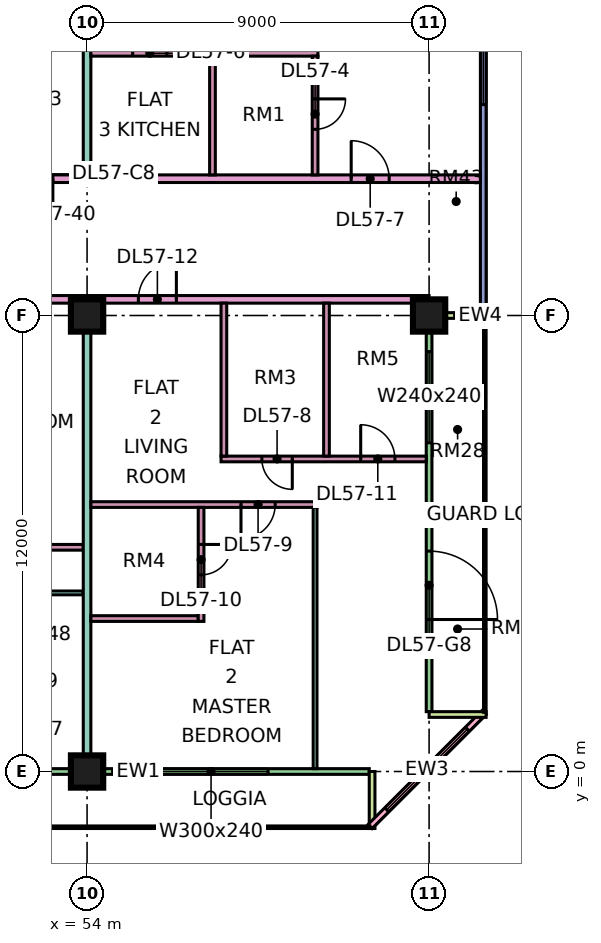
"""IFC4 building model, lengths in metres.
Left out: names, types, materials, properties, quantities, classifications, styles, units other than length and angle.
Written with IfcOpenShell. Run it as: python <this file> out.ifc"""

import sys

from ifc_helpers import new_model, si_unit, direction, frame, frame_2d, origin, origin_2d, place, context, subcontext, project, spatial, rectangle, extrude, element, fill, save


model = new_model("IFC4")
c1 = context("Model", 3, precision=1e-05, world=origin(), true_north=direction((0.0, 1.0)))
c2 = subcontext(c1, "Body", "Model", "MODEL_VIEW")
j1 = project(units=[si_unit("LENGTHUNIT", "METRE"), si_unit("PLANEANGLEUNIT", "RADIAN")], contexts=[c1])
p1 = place(None, origin())
s1 = spatial("IfcSite", under=j1, at=p1, CompositionType="ELEMENT")
p2 = place(p1, origin())
s2 = spatial("IfcBuilding", under=s1, at=p2, CompositionType="ELEMENT")
p3 = place(p2, frame((0.0, 0.0, 241.65)))
s3 = spatial("IfcBuildingStorey", under=s2, at=p3, CompositionType="ELEMENT", Elevation=241.65)
for number, where, z_axis, x_axis in (
    (1, (54.0, 0.0, 0.0), (0.0, 0.0, 1.0), (1.0, 0.0, 0.0)),
    (2, (54.0, 12.0, 0.0), (0.0, 0.0, 1.0), (1.0, 0.0, 0.0)),
    (3, (63.0, 12.0, 0.0), (0.0, 0.0, 1.0), (1.0, 0.0, 0.0)),
):
    element("IfcColumn", number, at=place(p3, frame(where, z_axis=z_axis, x_axis=x_axis)), inside=s3, PredefinedType="COLUMN", context=c2, shape_type="SweptSolid", body=[
        extrude(rectangle(XDim=0.85, YDim=0.85, at=origin_2d()), origin(), (0.0, 0.0, 1.0), 3.75),
    ])
p4 = place(p3, frame((48.075, 0.0, 0.0), z_axis=(0.0, 0.0, 1.0), x_axis=(1.0, 0.0, 0.0)))
e4 = element("IfcWall", 4, at=p4, inside=s3, PredefinedType="SOLIDWALL", context=c2, shape_type="SweptSolid", body=[
    extrude(rectangle(XDim=13.35, YDim=0.15, at=frame_2d((6.675, 0.0))), origin(), (0.0, 0.0, 1.0), 3.35),
])
p5 = place(p4, frame((0.562, 0.0, 0.45)))
e5 = element("IfcOpeningElement", 5, at=p5, cuts=e4, PredefinedType="OPENING", context=c2, shape_type="SweptSolid", body=[
    extrude(rectangle(XDim=1.8, YDim=2.4, at=frame_2d((0.9, 1.2))), frame((0.0, 0.085, 0.0), z_axis=(0.0, -1.0, 0.0), x_axis=(1.0, 0.0, 0.0)), (0.0, 0.0, 1.0), 0.17),
])
p6 = place(p4, frame((3.562, 0.0, 0.0)))
e6 = element("IfcOpeningElement", 6, at=p6, cuts=e4, PredefinedType="OPENING", context=c2, shape_type="SweptSolid", body=[
    extrude(rectangle(XDim=1.2, YDim=2.4, at=frame_2d((0.6, 1.2))), frame((0.0, 0.085, 0.0), z_axis=(0.0, -1.0, 0.0), x_axis=(1.0, 0.0, 0.0)), (0.0, 0.0, 1.0), 0.17),
])
p7 = place(p4, frame((7.688, 0.0, 0.45)))
e7 = element("IfcOpeningElement", 7, at=p7, cuts=e4, PredefinedType="OPENING", context=c2, shape_type="SweptSolid", body=[
    extrude(rectangle(XDim=3.0, YDim=2.4, at=frame_2d((1.5, 1.2))), frame((0.0, 0.085, 0.0), z_axis=(0.0, -1.0, 0.0), x_axis=(1.0, 0.0, 0.0)), (0.0, 0.0, 1.0), 0.17),
])
p8 = place(p3, frame((61.5, -1.5, 0.0), z_axis=(0.0, 0.0, 1.0), x_axis=(0.0, 1.0, 0.0)))
e8 = element("IfcWall", 8, at=p8, inside=s3, PredefinedType="SOLIDWALL", context=c2, shape_type="SweptSolid", body=[
    extrude(rectangle(XDim=1.5, YDim=0.15, at=frame_2d((0.75, 0.0))), origin(), (0.0, 0.0, 1.0), 3.35),
])
p9 = place(p3, frame((61.447, -1.447, 0.0), z_axis=(0.0, 0.0, 1.0), x_axis=(0.707106781187, 0.707106781187, 0.0)))
e9 = element("IfcWall", 9, at=p9, inside=s3, PredefinedType="SOLIDWALL", context=c2, shape_type="SweptSolid", body=[
    extrude(rectangle(XDim=4.243, YDim=0.15, at=frame_2d((2.121, 0.0))), origin(), (0.0, 0.0, 1.0), 3.35),
])
p10 = place(p9, frame((0.621, 0.0, 0.45)))
e10 = element("IfcOpeningElement", 10, at=p10, cuts=e9, PredefinedType="OPENING", context=c2, shape_type="SweptSolid", body=[
    extrude(rectangle(XDim=3.0, YDim=2.4, at=frame_2d((1.5, 1.2))), frame((0.0, 0.085, 0.0), z_axis=(0.0, -1.0, 0.0), x_axis=(1.0, 0.0, 0.0)), (0.0, 0.0, 1.0), 0.17),
])
p11 = place(p3, frame((63.0, 1.575, 0.0), z_axis=(0.0, 0.0, 1.0), x_axis=(0.0, 1.0, 0.0)))
e11 = element("IfcWall", 11, at=p11, inside=s3, PredefinedType="SOLIDWALL", context=c2, shape_type="SweptSolid", body=[
    extrude(rectangle(XDim=10.35, YDim=0.15, at=frame_2d((5.175, 0.0))), origin(), (0.0, 0.0, 1.0), 3.35),
])
p12 = place(p11, frame((2.425, 0.0, 0.0)))
e12 = element("IfcOpeningElement", 12, at=p12, cuts=e11, PredefinedType="OPENING", context=c2, shape_type="SweptSolid", body=[
    extrude(rectangle(XDim=1.8, YDim=2.4, at=frame_2d((0.9, 1.2))), frame((0.0, 0.085, 0.0), z_axis=(0.0, -1.0, 0.0), x_axis=(1.0, 0.0, 0.0)), (0.0, 0.0, 1.0), 0.17),
])
p13 = place(p11, frame((7.075, 0.0, 0.45)))
e13 = element("IfcOpeningElement", 13, at=p13, cuts=e11, PredefinedType="OPENING", context=c2, shape_type="SweptSolid", body=[
    extrude(rectangle(XDim=2.4, YDim=2.4, at=frame_2d((1.2, 1.2))), frame((0.0, 0.085, 0.0), z_axis=(0.0, -1.0, 0.0), x_axis=(1.0, 0.0, 0.0)), (0.0, 0.0, 1.0), 0.17),
])
for number, where, z_axis, x_axis in (
    (14, (64.5, 1.5, 0.0), (0.0, 0.0, 1.0), (-1.0, 0.0, 0.0)),
    (15, (64.5, 12.0, 0.0), (0.0, 0.0, 1.0), (-1.0, 0.0, 0.0)),
):
    element("IfcWall", number, at=place(p3, frame(where, z_axis=z_axis, x_axis=x_axis)), inside=s3, PredefinedType="SOLIDWALL", context=c2, shape_type="SweptSolid", body=[
        extrude(rectangle(XDim=1.5, YDim=0.15, at=frame_2d((0.75, 0.0))), origin(), (0.0, 0.0, 1.0), 3.35),
    ])
p14 = place(p3, frame((64.425, 12.075, 0.0), z_axis=(0.0, 0.0, 1.0), x_axis=(0.0, 1.0, 0.0)))
e16 = element("IfcWall", 16, at=p14, inside=s3, PredefinedType="SOLIDWALL", context=c2, shape_type="SweptSolid", body=[
    extrude(rectangle(XDim=10.425, YDim=0.15, at=frame_2d((5.212, 0.0))), origin(), (0.0, 0.0, 1.0), 3.35),
])
p15 = place(p14, frame((5.475, 0.0, 0.45)))
e17 = element("IfcOpeningElement", 17, at=p15, cuts=e16, PredefinedType="OPENING", context=c2, shape_type="SweptSolid", body=[
    extrude(rectangle(XDim=3.0, YDim=2.4, at=frame_2d((1.5, 1.2))), frame((0.0, 0.085, 0.0), z_axis=(0.0, -1.0, 0.0), x_axis=(1.0, 0.0, 0.0)), (0.0, 0.0, 1.0), 0.17),
])
p16 = place(p3, frame((33.05, 4.7, 0.0), z_axis=(0.0, 0.0, 1.0), x_axis=(1.0, 0.0, 0.0)))
e18 = element("IfcWall", 18, at=p16, inside=s3, PredefinedType="PARTITIONING", context=c2, shape_type="SweptSolid", body=[
    extrude(rectangle(XDim=20.85, YDim=0.1, at=frame_2d((10.425, 0.0))), origin(), (0.0, 0.0, 1.0), 3.35),
])
p17 = place(p16, frame((1.0, 0.0, 0.0)))
e19 = element("IfcOpeningElement", 19, at=p17, cuts=e18, PredefinedType="OPENING", context=c2, shape_type="SweptSolid", body=[
    extrude(rectangle(XDim=0.9, YDim=2.1, at=frame_2d((0.45, 1.05))), frame((0.0, 0.06, 0.0), z_axis=(0.0, -1.0, 0.0), x_axis=(1.0, 0.0, 0.0)), (0.0, 0.0, 1.0), 0.12),
])
p18 = place(p16, frame((4.0, 0.0, 0.0)))
e20 = element("IfcOpeningElement", 20, at=p18, cuts=e18, PredefinedType="OPENING", context=c2, shape_type="SweptSolid", body=[
    extrude(rectangle(XDim=0.9, YDim=2.1, at=frame_2d((0.45, 1.05))), frame((0.0, 0.06, 0.0), z_axis=(0.0, -1.0, 0.0), x_axis=(1.0, 0.0, 0.0)), (0.0, 0.0, 1.0), 0.12),
])
p19 = place(p16, frame((7.0, 0.0, 0.0)))
e21 = element("IfcOpeningElement", 21, at=p19, cuts=e18, PredefinedType="OPENING", context=c2, shape_type="SweptSolid", body=[
    extrude(rectangle(XDim=0.9, YDim=2.1, at=frame_2d((0.45, 1.05))), frame((0.0, 0.06, 0.0), z_axis=(0.0, -1.0, 0.0), x_axis=(1.0, 0.0, 0.0)), (0.0, 0.0, 1.0), 0.12),
])
p20 = place(p16, frame((19.0, 0.0, 0.0)))
e22 = element("IfcOpeningElement", 22, at=p20, cuts=e18, PredefinedType="OPENING", context=c2, shape_type="SweptSolid", body=[
    extrude(rectangle(XDim=0.9, YDim=2.1, at=frame_2d((0.45, 1.05))), frame((0.0, 0.06, 0.0), z_axis=(0.0, -1.0, 0.0), x_axis=(1.0, 0.0, 0.0)), (0.0, 0.0, 1.0), 0.12),
])
p21 = place(p16, frame((13.0, 0.0, 0.0)))
e23 = element("IfcOpeningElement", 23, at=p21, cuts=e18, PredefinedType="OPENING", context=c2, shape_type="SweptSolid", body=[
    extrude(rectangle(XDim=0.9, YDim=2.1, at=frame_2d((0.45, 1.05))), frame((0.0, 0.06, 0.0), z_axis=(0.0, -1.0, 0.0), x_axis=(1.0, 0.0, 0.0)), (0.0, 0.0, 1.0), 0.12),
])
p22 = place(p3, frame((40.65, 12.425, 0.0), z_axis=(0.0, 0.0, 1.0), x_axis=(1.0, 0.0, 0.0)))
e24 = element("IfcWall", 24, at=p22, inside=s3, PredefinedType="PARTITIONING", context=c2, shape_type="SweptSolid", body=[
    extrude(rectangle(XDim=22.35, YDim=0.2, at=frame_2d((11.175, 0.0))), origin(), (0.0, 0.0, 1.0), 3.35),
])
p23 = place(p22, frame((14.7, 0.0, 0.0)))
e25 = element("IfcOpeningElement", 25, at=p23, cuts=e24, PredefinedType="OPENING", context=c2, shape_type="SweptSolid", body=[
    extrude(rectangle(XDim=1.0, YDim=2.1, at=frame_2d((0.5, 1.05))), frame((0.0, 0.11, 0.0), z_axis=(0.0, -1.0, 0.0), x_axis=(1.0, 0.0, 0.0)), (0.0, 0.0, 1.0), 0.22),
])
p24 = place(p22, frame((1.05, 0.0, 0.0)))
e26 = element("IfcOpeningElement", 26, at=p24, cuts=e24, PredefinedType="OPENING", context=c2, shape_type="SweptSolid", body=[
    extrude(rectangle(XDim=1.0, YDim=2.1, at=frame_2d((0.5, 1.05))), frame((0.0, 0.11, 0.0), z_axis=(0.0, -1.0, 0.0), x_axis=(1.0, 0.0, 0.0)), (0.0, 0.0, 1.0), 0.22),
])
p25 = place(p3, frame((43.575, 5.9, 0.0), z_axis=(0.0, 0.0, 1.0), x_axis=(1.0, 0.0, 0.0)))
e27 = element("IfcWall", 27, at=p25, inside=s3, PredefinedType="PARTITIONING", context=c2, shape_type="SweptSolid", body=[
    extrude(rectangle(XDim=10.325, YDim=0.15, at=frame_2d((5.163, 0.0))), origin(), (0.0, 0.0, 1.0), 3.35),
])
p26 = place(p25, frame((1.825, 0.0, 0.0)))
e28 = element("IfcOpeningElement", 28, at=p26, cuts=e27, PredefinedType="OPENING", context=c2, shape_type="SweptSolid", body=[
    extrude(rectangle(XDim=0.8, YDim=2.1, at=frame_2d((0.4, 1.05))), frame((0.0, 0.085, 0.0), z_axis=(0.0, -1.0, 0.0), x_axis=(1.0, 0.0, 0.0)), (0.0, 0.0, 1.0), 0.17),
])
p27 = place(p25, frame((6.975, 0.0, 0.0)))
e29 = element("IfcOpeningElement", 29, at=p27, cuts=e27, PredefinedType="OPENING", context=c2, shape_type="SweptSolid", body=[
    extrude(rectangle(XDim=0.9, YDim=2.1, at=frame_2d((0.45, 1.05))), frame((0.0, 0.085, 0.0), z_axis=(0.0, -1.0, 0.0), x_axis=(1.0, 0.0, 0.0)), (0.0, 0.0, 1.0), 0.17),
])
p28 = place(p3, frame((51.225, 15.6, 0.0), z_axis=(0.0, 0.0, 1.0), x_axis=(1.0, 0.0, 0.0)))
e30 = element("IfcWall", 30, at=p28, inside=s3, PredefinedType="PARTITIONING", context=c2, shape_type="SweptSolid", body=[
    extrude(rectangle(XDim=13.125, YDim=0.2, at=frame_2d((6.562, 0.0))), origin(), (0.0, 0.0, 1.0), 3.35),
])
p29 = place(p28, frame((9.725, 0.0, 0.0)))
e31 = element("IfcOpeningElement", 31, at=p29, cuts=e30, PredefinedType="OPENING", context=c2, shape_type="SweptSolid", body=[
    extrude(rectangle(XDim=1.0, YDim=2.1, at=frame_2d((0.5, 1.05))), frame((0.0, 0.11, 0.0), z_axis=(0.0, -1.0, 0.0), x_axis=(1.0, 0.0, 0.0)), (0.0, 0.0, 1.0), 0.22),
])
p30 = place(p28, frame((0.875, 0.0, 0.0)))
e32 = element("IfcOpeningElement", 32, at=p30, cuts=e30, PredefinedType="OPENING", context=c2, shape_type="SweptSolid", body=[
    extrude(rectangle(XDim=1.0, YDim=2.1, at=frame_2d((0.5, 1.05))), frame((0.0, 0.11, 0.0), z_axis=(0.0, -1.0, 0.0), x_axis=(1.0, 0.0, 0.0)), (0.0, 0.0, 1.0), 0.22),
])
p31 = place(p3, frame((54.0, 0.074, 0.0), z_axis=(0.0, 0.0, 1.0), x_axis=(0.0, 1.0, 0.0)))
e33 = element("IfcWall", 33, at=p31, inside=s3, PredefinedType="PARTITIONING", context=c2, shape_type="SweptSolid", body=[
    extrude(rectangle(XDim=12.251, YDim=0.2, at=frame_2d((6.125, 0.0))), origin(), (0.0, 0.0, 1.0), 3.35),
])
p32 = place(p3, frame((54.0, 15.7, 0.0), z_axis=(0.0, 0.0, 1.0), x_axis=(0.0, 1.0, 0.0)))
e34 = element("IfcWall", 34, at=p32, inside=s3, PredefinedType="PARTITIONING", context=c2, shape_type="SweptSolid", body=[
    extrude(rectangle(XDim=8.226, YDim=0.2, at=frame_2d((4.113, 0.0))), origin(), (0.0, 0.0, 1.0), 3.35),
])
p33 = place(p3, frame((54.1, 4.025, 0.0), z_axis=(0.0, 0.0, 1.0), x_axis=(1.0, 0.0, 0.0)))
e35 = element("IfcWall", 35, at=p33, inside=s3, PredefinedType="PARTITIONING", context=c2, shape_type="SweptSolid", body=[
    extrude(rectangle(XDim=2.825, YDim=0.15, at=frame_2d((1.413, 0.0))), origin(), (0.0, 0.0, 1.0), 3.35),
])
p34 = place(p3, frame((54.1, 7.025, 0.0), z_axis=(0.0, 0.0, 1.0), x_axis=(1.0, 0.0, 0.0)))
e36 = element("IfcWall", 36, at=p34, inside=s3, PredefinedType="PARTITIONING", context=c2, shape_type="SweptSolid", body=[
    extrude(rectangle(XDim=5.95, YDim=0.15, at=frame_2d((2.975, 0.0))), origin(), (0.0, 0.0, 1.0), 3.35),
])
p35 = place(p34, frame((3.95, 0.0, 0.0)))
e37 = element("IfcOpeningElement", 37, at=p35, cuts=e36, PredefinedType="OPENING", context=c2, shape_type="SweptSolid", body=[
    extrude(rectangle(XDim=0.9, YDim=2.1, at=frame_2d((0.45, 1.05))), frame((0.0, 0.085, 0.0), z_axis=(0.0, -1.0, 0.0), x_axis=(1.0, 0.0, 0.0)), (0.0, 0.0, 1.0), 0.17),
])
p36 = place(p3, frame((54.1, 18.9, 0.0), z_axis=(0.0, 0.0, 1.0), x_axis=(1.0, 0.0, 0.0)))
e38 = element("IfcWall", 38, at=p36, inside=s3, PredefinedType="PARTITIONING", context=c2, shape_type="SweptSolid", body=[
    extrude(rectangle(XDim=5.975, YDim=0.15, at=frame_2d((2.987, 0.0))), origin(), (0.0, 0.0, 1.0), 3.35),
])
p37 = place(p36, frame((1.1, 0.0, 0.0)))
e39 = element("IfcOpeningElement", 39, at=p37, cuts=e38, PredefinedType="OPENING", context=c2, shape_type="SweptSolid", body=[
    extrude(rectangle(XDim=0.9, YDim=2.1, at=frame_2d((0.45, 1.05))), frame((0.0, 0.085, 0.0), z_axis=(0.0, -1.0, 0.0), x_axis=(1.0, 0.0, 0.0)), (0.0, 0.0, 1.0), 0.17),
])
p38 = place(p3, frame((57.0, 3.95, 0.0), z_axis=(0.0, 0.0, 1.0), x_axis=(0.0, 1.0, 0.0)))
e40 = element("IfcWall", 40, at=p38, inside=s3, PredefinedType="PARTITIONING", context=c2, shape_type="SweptSolid", body=[
    extrude(rectangle(XDim=3.0, YDim=0.15, at=frame_2d((1.5, 0.0))), origin(), (0.0, 0.0, 1.0), 3.35),
])
p39 = place(p38, frame((1.225, 0.0, 0.0)))
e41 = element("IfcOpeningElement", 41, at=p39, cuts=e40, PredefinedType="OPENING", context=c2, shape_type="SweptSolid", body=[
    extrude(rectangle(XDim=0.8, YDim=2.1, at=frame_2d((0.4, 1.05))), frame((0.0, 0.085, 0.0), z_axis=(0.0, -1.0, 0.0), x_axis=(1.0, 0.0, 0.0)), (0.0, 0.0, 1.0), 0.17),
])
p40 = place(p3, frame((57.3, 15.7, 0.0), z_axis=(0.0, 0.0, 1.0), x_axis=(0.0, 1.0, 0.0)))
e42 = element("IfcWall", 42, at=p40, inside=s3, PredefinedType="PARTITIONING", context=c2, shape_type="SweptSolid", body=[
    extrude(rectangle(XDim=3.125, YDim=0.15, at=frame_2d((1.562, 0.0))), origin(), (0.0, 0.0, 1.0), 3.35),
])
p41 = place(p3, frame((57.525, 8.225, 0.0), z_axis=(0.0, 0.0, 1.0), x_axis=(1.0, 0.0, 0.0)))
e43 = element("IfcWall", 43, at=p41, inside=s3, PredefinedType="PARTITIONING", context=c2, shape_type="SweptSolid", body=[
    extrude(rectangle(XDim=5.401, YDim=0.15, at=frame_2d((2.701, 0.0))), origin(), (0.0, 0.0, 1.0), 3.35),
])
p42 = place(p41, frame((1.075, 0.0, 0.0)))
e44 = element("IfcOpeningElement", 44, at=p42, cuts=e43, PredefinedType="OPENING", context=c2, shape_type="SweptSolid", body=[
    extrude(rectangle(XDim=0.8, YDim=2.1, at=frame_2d((0.4, 1.05))), frame((0.0, 0.085, 0.0), z_axis=(0.0, -1.0, 0.0), x_axis=(1.0, 0.0, 0.0)), (0.0, 0.0, 1.0), 0.17),
])
p43 = place(p41, frame((3.675, 0.0, 0.0)))
e45 = element("IfcOpeningElement", 45, at=p43, cuts=e43, PredefinedType="OPENING", context=c2, shape_type="SweptSolid", body=[
    extrude(rectangle(XDim=0.9, YDim=2.1, at=frame_2d((0.45, 1.05))), frame((0.0, 0.085, 0.0), z_axis=(0.0, -1.0, 0.0), x_axis=(1.0, 0.0, 0.0)), (0.0, 0.0, 1.0), 0.17),
])
p44 = place(p3, frame((57.6, 8.3, 0.0), z_axis=(0.0, 0.0, 1.0), x_axis=(0.0, 1.0, 0.0)))
e46 = element("IfcWall", 46, at=p44, inside=s3, PredefinedType="PARTITIONING", context=c2, shape_type="SweptSolid", body=[
    extrude(rectangle(XDim=4.025, YDim=0.15, at=frame_2d((2.012, 0.0))), origin(), (0.0, 0.0, 1.0), 3.35),
])
p45 = place(p3, frame((60.0, 0.074, 0.0), z_axis=(0.0, 0.0, 1.0), x_axis=(0.0, 1.0, 0.0)))
e47 = element("IfcWall", 47, at=p45, inside=s3, PredefinedType="PARTITIONING", context=c2, shape_type="SweptSolid", body=[
    extrude(rectangle(XDim=6.876, YDim=0.1, at=frame_2d((3.438, 0.0))), origin(), (0.0, 0.0, 1.0), 3.35),
])
p46 = place(p3, frame((60.0, 15.7, 0.0), z_axis=(0.0, 0.0, 1.0), x_axis=(0.0, 1.0, 0.0)))
e48 = element("IfcWall", 48, at=p46, inside=s3, PredefinedType="PARTITIONING", context=c2, shape_type="SweptSolid", body=[
    extrude(rectangle(XDim=3.125, YDim=0.15, at=frame_2d((1.562, 0.0))), origin(), (0.0, 0.0, 1.0), 3.35),
])
p47 = place(p46, frame((1.2, 0.0, 0.0)))
e49 = element("IfcOpeningElement", 49, at=p47, cuts=e48, PredefinedType="OPENING", context=c2, shape_type="SweptSolid", body=[
    extrude(rectangle(XDim=0.8, YDim=2.1, at=frame_2d((0.4, 1.05))), frame((0.0, 0.085, 0.0), z_axis=(0.0, -1.0, 0.0), x_axis=(1.0, 0.0, 0.0)), (0.0, 0.0, 1.0), 0.17),
])
p48 = place(p3, frame((60.3, 8.3, 0.0), z_axis=(0.0, 0.0, 1.0), x_axis=(0.0, 1.0, 0.0)))
e50 = element("IfcWall", 50, at=p48, inside=s3, PredefinedType="PARTITIONING", context=c2, shape_type="SweptSolid", body=[
    extrude(rectangle(XDim=4.025, YDim=0.15, at=frame_2d((2.012, 0.0))), origin(), (0.0, 0.0, 1.0), 3.35),
])
p49 = place(p7, origin())
e51 = element("IfcWindow", 51, at=p49, inside=s3, PartitioningType="SINGLE_PANEL", PredefinedType="WINDOW", context=c2, shape_type="SweptSolid", body=[
    extrude(rectangle(XDim=3.0, YDim=2.4, at=frame_2d((1.5, 1.2))), frame((0.0, 0.03, 0.0), z_axis=(0.0, -1.0, 0.0), x_axis=(1.0, 0.0, 0.0)), (0.0, 0.0, 1.0), 0.06),
])
fill(e7, e51)
p50 = place(p10, origin())
e52 = element("IfcWindow", 52, at=p50, inside=s3, PartitioningType="SINGLE_PANEL", PredefinedType="WINDOW", context=c2, shape_type="SweptSolid", body=[
    extrude(rectangle(XDim=3.0, YDim=2.4, at=frame_2d((1.5, 1.2))), frame((0.0, 0.03, 0.0), z_axis=(0.0, -1.0, 0.0), x_axis=(1.0, 0.0, 0.0)), (0.0, 0.0, 1.0), 0.06),
])
fill(e10, e52)
p51 = place(p12, frame((1.8, 0.0, 0.0), z_axis=(0.0, 0.0, 1.0), x_axis=(-1.0, 0.0, 0.0)))
e53 = element("IfcDoor", 53, at=p51, inside=s3, OperationType="DOUBLE_DOOR_SINGLE_SWING", PredefinedType="DOOR", context=c2, shape_type="SweptSolid", body=[
    extrude(rectangle(XDim=1.8, YDim=2.4, at=frame_2d((0.9, 1.2))), frame((0.0, 0.025, 0.0), z_axis=(0.0, -1.0, 0.0), x_axis=(1.0, 0.0, 0.0)), (0.0, 0.0, 1.0), 0.05),
])
fill(e12, e53)
p52 = place(p13, origin())
e54 = element("IfcWindow", 54, at=p52, inside=s3, PartitioningType="SINGLE_PANEL", PredefinedType="WINDOW", context=c2, shape_type="SweptSolid", body=[
    extrude(rectangle(XDim=2.4, YDim=2.4, at=frame_2d((1.2, 1.2))), frame((0.0, 0.03, 0.0), z_axis=(0.0, -1.0, 0.0), x_axis=(1.0, 0.0, 0.0)), (0.0, 0.0, 1.0), 0.06),
])
fill(e13, e54)
p53 = place(p15, origin())
e55 = element("IfcWindow", 55, at=p53, inside=s3, PartitioningType="SINGLE_PANEL", PredefinedType="WINDOW", context=c2, shape_type="SweptSolid", body=[
    extrude(rectangle(XDim=3.0, YDim=2.4, at=frame_2d((1.5, 1.2))), frame((0.0, 0.03, 0.0), z_axis=(0.0, -1.0, 0.0), x_axis=(1.0, 0.0, 0.0)), (0.0, 0.0, 1.0), 0.06),
])
fill(e17, e55)
p54 = place(p47, origin())
e56 = element("IfcDoor", 56, at=p54, inside=s3, OperationType="SINGLE_SWING_RIGHT", PredefinedType="DOOR", context=c2, shape_type="SweptSolid", body=[
    extrude(rectangle(XDim=0.8, YDim=2.1, at=frame_2d((0.4, 1.05))), frame((0.0, 0.025, 0.0), z_axis=(0.0, -1.0, 0.0), x_axis=(1.0, 0.0, 0.0)), (0.0, 0.0, 1.0), 0.05),
])
fill(e49, e56)
p55 = place(p37, frame((0.9, 0.0, 0.0), z_axis=(0.0, 0.0, 1.0), x_axis=(-1.0, 0.0, 0.0)))
e57 = element("IfcDoor", 57, at=p55, inside=s3, OperationType="SINGLE_SWING_RIGHT", PredefinedType="DOOR", context=c2, shape_type="SweptSolid", body=[
    extrude(rectangle(XDim=0.9, YDim=2.1, at=frame_2d((0.45, 1.05))), frame((0.0, 0.025, 0.0), z_axis=(0.0, -1.0, 0.0), x_axis=(1.0, 0.0, 0.0)), (0.0, 0.0, 1.0), 0.05),
])
fill(e39, e57)
p56 = place(p29, origin())
e58 = element("IfcDoor", 58, at=p56, inside=s3, OperationType="SINGLE_SWING_LEFT", PredefinedType="DOOR", context=c2, shape_type="SweptSolid", body=[
    extrude(rectangle(XDim=1.0, YDim=2.1, at=frame_2d((0.5, 1.05))), frame((0.0, 0.025, 0.0), z_axis=(0.0, -1.0, 0.0), x_axis=(1.0, 0.0, 0.0)), (0.0, 0.0, 1.0), 0.05),
])
fill(e31, e58)
p57 = place(p42, origin())
e59 = element("IfcDoor", 59, at=p57, inside=s3, OperationType="SINGLE_SWING_RIGHT", PredefinedType="DOOR", context=c2, shape_type="SweptSolid", body=[
    extrude(rectangle(XDim=0.8, YDim=2.1, at=frame_2d((0.4, 1.05))), frame((0.0, 0.025, 0.0), z_axis=(0.0, -1.0, 0.0), x_axis=(1.0, 0.0, 0.0)), (0.0, 0.0, 1.0), 0.05),
])
fill(e44, e59)
p58 = place(p35, frame((0.9, 0.0, 0.0), z_axis=(0.0, 0.0, 1.0), x_axis=(-1.0, 0.0, 0.0)))
e60 = element("IfcDoor", 60, at=p58, inside=s3, OperationType="SINGLE_SWING_LEFT", PredefinedType="DOOR", context=c2, shape_type="SweptSolid", body=[
    extrude(rectangle(XDim=0.9, YDim=2.1, at=frame_2d((0.45, 1.05))), frame((0.0, 0.025, 0.0), z_axis=(0.0, -1.0, 0.0), x_axis=(1.0, 0.0, 0.0)), (0.0, 0.0, 1.0), 0.05),
])
fill(e37, e60)
p59 = place(p39, origin())
e61 = element("IfcDoor", 61, at=p59, inside=s3, OperationType="SINGLE_SWING_RIGHT", PredefinedType="DOOR", context=c2, shape_type="SweptSolid", body=[
    extrude(rectangle(XDim=0.8, YDim=2.1, at=frame_2d((0.4, 1.05))), frame((0.0, 0.025, 0.0), z_axis=(0.0, -1.0, 0.0), x_axis=(1.0, 0.0, 0.0)), (0.0, 0.0, 1.0), 0.05),
])
fill(e41, e61)
p60 = place(p43, origin())
e62 = element("IfcDoor", 62, at=p60, inside=s3, OperationType="SINGLE_SWING_LEFT", PredefinedType="DOOR", context=c2, shape_type="SweptSolid", body=[
    extrude(rectangle(XDim=0.9, YDim=2.1, at=frame_2d((0.45, 1.05))), frame((0.0, 0.025, 0.0), z_axis=(0.0, -1.0, 0.0), x_axis=(1.0, 0.0, 0.0)), (0.0, 0.0, 1.0), 0.05),
])
fill(e45, e62)
p61 = place(p23, frame((1.0, 0.0, 0.0), z_axis=(0.0, 0.0, 1.0), x_axis=(-1.0, 0.0, 0.0)))
e63 = element("IfcDoor", 63, at=p61, inside=s3, OperationType="SINGLE_SWING_RIGHT", PredefinedType="DOOR", context=c2, shape_type="SweptSolid", body=[
    extrude(rectangle(XDim=1.0, YDim=2.1, at=frame_2d((0.5, 1.05))), frame((0.0, 0.025, 0.0), z_axis=(0.0, -1.0, 0.0), x_axis=(1.0, 0.0, 0.0)), (0.0, 0.0, 1.0), 0.05),
])
fill(e25, e63)
p62 = place(p30, origin())
e64 = element("IfcDoor", 64, at=p62, inside=s3, OperationType="SINGLE_SWING_RIGHT", PredefinedType="DOOR", context=c2, shape_type="SweptSolid", body=[
    extrude(rectangle(XDim=1.0, YDim=2.1, at=frame_2d((0.5, 1.05))), frame((0.0, 0.025, 0.0), z_axis=(0.0, -1.0, 0.0), x_axis=(1.0, 0.0, 0.0)), (0.0, 0.0, 1.0), 0.05),
])
fill(e32, e64)
save(model, sys.argv[1])
